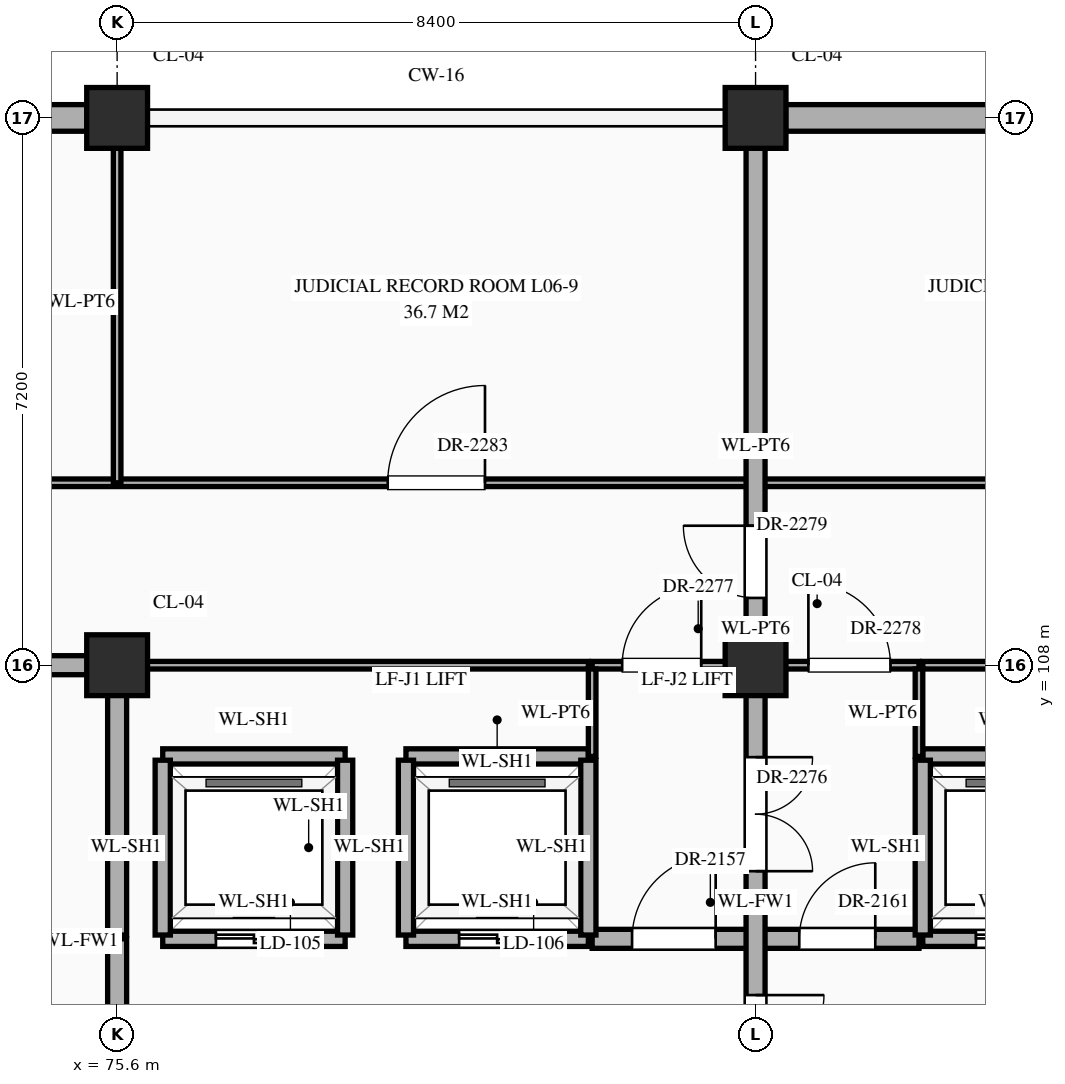
"""IFC4 building model, lengths in metres.
Left out: names, types, materials, properties, quantities, classifications, styles, units other than length and angle.
Written with IfcOpenShell. Run it as: python <this file> out.ifc"""

import sys

from ifc_helpers import new_model, si_unit, direction, frame, frame_2d, origin, origin_2d, place, context, subcontext, project, spatial, rectangle, extrude, element, fill, save


model = new_model("IFC4")
c1 = context("Model", 3, precision=1e-05, world=origin(), true_north=direction((0.0, 1.0)))
c2 = subcontext(c1, "Body", "Model", "MODEL_VIEW")
j1 = project(units=[si_unit("LENGTHUNIT", "METRE"), si_unit("PLANEANGLEUNIT", "RADIAN")], contexts=[c1])
p1 = place(None, origin())
s1 = spatial("IfcSite", under=j1, at=p1, CompositionType="ELEMENT")
p2 = place(p1, origin())
s2 = spatial("IfcBuilding", under=s1, at=p2, CompositionType="ELEMENT")
p3 = place(p2, frame((0.0, 0.0, 26.1)))
s3 = spatial("IfcBuildingStorey", under=s2, at=p3, CompositionType="ELEMENT", Elevation=26.1)
for number, where, z_axis, x_axis in (
    (1, (75.6, 108.0, 0.0), (0.0, 0.0, 1.0), (1.0, 0.0, 0.0)),
    (2, (75.6, 115.2, 0.0), (0.0, 0.0, 1.0), (1.0, 0.0, 0.0)),
    (3, (84.0, 108.0, 0.0), (0.0, 0.0, 1.0), (1.0, 0.0, 0.0)),
    (4, (84.0, 115.2, 0.0), (0.0, 0.0, 1.0), (1.0, 0.0, 0.0)),
):
    element("IfcColumn", number, at=place(p3, frame(where, z_axis=z_axis, x_axis=x_axis)), inside=s3, PredefinedType="COLUMN", context=c2, shape_type="SweptSolid", body=[
        extrude(rectangle(XDim=0.8, YDim=0.8, at=origin_2d()), origin(), (0.0, 0.0, 1.0), 4.5),
    ])
p4 = place(p3, frame((67.595, 115.2, 0.0), z_axis=(0.0, 0.0, 1.0), x_axis=(1.0, 0.0, 0.0)))
e5 = element("IfcWall", 5, at=p4, inside=s3, PredefinedType="STANDARD", context=c2, shape_type="SweptSolid", body=[
    extrude(rectangle(XDim=7.61, YDim=0.35, at=frame_2d((3.805, 0.0))), origin(), (0.0, 0.0, 1.0), 3.59),
])
p5 = place(p4, frame((3.28, 0.0, 0.85)))
e6 = element("IfcOpeningElement", 6, at=p5, cuts=e5, PredefinedType="OPENING", context=c2, shape_type="SweptSolid", body=[
    extrude(rectangle(XDim=1.05, YDim=1.74, at=frame_2d((0.525, 0.87))), frame((0.0, 0.187, 0.0), z_axis=(0.0, -1.0, 0.0), x_axis=(1.0, 0.0, 0.0)), (0.0, 0.0, 1.0), 0.374),
])
p6 = place(p3, frame((84.395, 115.2, 0.0), z_axis=(0.0, 0.0, 1.0), x_axis=(1.0, 0.0, 0.0)))
e7 = element("IfcWall", 7, at=p6, inside=s3, PredefinedType="STANDARD", context=c2, shape_type="SweptSolid", body=[
    extrude(rectangle(XDim=7.61, YDim=0.35, at=frame_2d((3.805, 0.0))), origin(), (0.0, 0.0, 1.0), 3.59),
])
p7 = place(p6, frame((3.28, 0.0, 0.85)))
e8 = element("IfcOpeningElement", 8, at=p7, cuts=e7, PredefinedType="OPENING", context=c2, shape_type="SweptSolid", body=[
    extrude(rectangle(XDim=1.05, YDim=2.12, at=frame_2d((0.525, 1.06))), frame((0.0, 0.187, 0.0), z_axis=(0.0, -1.0, 0.0), x_axis=(1.0, 0.0, 0.0)), (0.0, 0.0, 1.0), 0.374),
])
p8 = place(p3, frame((76.2, 104.4, 0.0), z_axis=(0.0, 0.0, 1.0), x_axis=(1.0, 0.0, 0.0)))
e9 = element("IfcWall", 9, at=p8, inside=s3, PredefinedType="STANDARD", context=c2, shape_type="SweptSolid", body=[
    extrude(rectangle(XDim=2.4, YDim=0.2, at=frame_2d((1.2, 0.0))), origin(), (0.0, 0.0, 1.0), 4.24),
])
p9 = place(p8, frame((0.7, 0.0, 0.0)))
e10 = element("IfcOpeningElement", 10, at=p9, cuts=e9, PredefinedType="OPENING", context=c2, shape_type="SweptSolid", body=[
    extrude(rectangle(XDim=1.0, YDim=2.15, at=frame_2d((0.5, 1.075))), frame((0.0, 0.112, 0.0), z_axis=(0.0, -1.0, 0.0), x_axis=(1.0, 0.0, 0.0)), (0.0, 0.0, 1.0), 0.224),
])
p10 = place(p3, frame((79.4, 104.4, 0.0), z_axis=(0.0, 0.0, 1.0), x_axis=(1.0, 0.0, 0.0)))
e11 = element("IfcWall", 11, at=p10, inside=s3, PredefinedType="STANDARD", context=c2, shape_type="SweptSolid", body=[
    extrude(rectangle(XDim=2.4, YDim=0.2, at=frame_2d((1.2, 0.0))), origin(), (0.0, 0.0, 1.0), 4.24),
])
p11 = place(p10, frame((0.7, 0.0, 0.0)))
e12 = element("IfcOpeningElement", 12, at=p11, cuts=e11, PredefinedType="OPENING", context=c2, shape_type="SweptSolid", body=[
    extrude(rectangle(XDim=1.0, YDim=2.15, at=frame_2d((0.5, 1.075))), frame((0.0, 0.112, 0.0), z_axis=(0.0, -1.0, 0.0), x_axis=(1.0, 0.0, 0.0)), (0.0, 0.0, 1.0), 0.224),
])
p12 = place(p3, frame((81.85, 104.4, 0.0), z_axis=(0.0, 0.0, 1.0), x_axis=(1.0, 0.0, 0.0)))
e13 = element("IfcWall", 13, at=p12, inside=s3, PredefinedType="STANDARD", context=c2, shape_type="SweptSolid", body=[
    extrude(rectangle(XDim=4.3, YDim=0.25, at=frame_2d((2.15, 0.0))), origin(), (0.0, 0.0, 1.0), 4.24),
])
p13 = place(p12, frame((0.525, 0.0, 0.0)))
e14 = element("IfcOpeningElement", 14, at=p13, cuts=e13, PredefinedType="OPENING", context=c2, shape_type="SweptSolid", body=[
    extrude(rectangle(XDim=1.1, YDim=2.2, at=frame_2d((0.55, 1.1))), frame((0.0, 0.137, 0.0), z_axis=(0.0, -1.0, 0.0), x_axis=(1.0, 0.0, 0.0)), (0.0, 0.0, 1.0), 0.274),
])
p14 = place(p12, frame((2.725, 0.0, 0.0)))
e15 = element("IfcOpeningElement", 15, at=p14, cuts=e13, PredefinedType="OPENING", context=c2, shape_type="SweptSolid", body=[
    extrude(rectangle(XDim=1.0, YDim=2.2, at=frame_2d((0.5, 1.1))), frame((0.0, 0.137, 0.0), z_axis=(0.0, -1.0, 0.0), x_axis=(1.0, 0.0, 0.0)), (0.0, 0.0, 1.0), 0.274),
])
p15 = place(p3, frame((86.2, 104.4, 0.0), z_axis=(0.0, 0.0, 1.0), x_axis=(1.0, 0.0, 0.0)))
e16 = element("IfcWall", 16, at=p15, inside=s3, PredefinedType="STANDARD", context=c2, shape_type="SweptSolid", body=[
    extrude(rectangle(XDim=2.4, YDim=0.2, at=frame_2d((1.2, 0.0))), origin(), (0.0, 0.0, 1.0), 4.24),
])
p16 = place(p15, frame((0.7, 0.0, 0.0)))
e17 = element("IfcOpeningElement", 17, at=p16, cuts=e16, PredefinedType="OPENING", context=c2, shape_type="SweptSolid", body=[
    extrude(rectangle(XDim=1.0, YDim=2.15, at=frame_2d((0.5, 1.075))), frame((0.0, 0.112, 0.0), z_axis=(0.0, -1.0, 0.0), x_axis=(1.0, 0.0, 0.0)), (0.0, 0.0, 1.0), 0.224),
])
for number, where, z_axis, x_axis in (
    (18, (76.2, 106.8, 0.0), (0.0, 0.0, 1.0), (1.0, 0.0, 0.0)),
    (19, (79.4, 106.8, 0.0), (0.0, 0.0, 1.0), (1.0, 0.0, 0.0)),
    (20, (86.2, 106.8, 0.0), (0.0, 0.0, 1.0), (1.0, 0.0, 0.0)),
):
    element("IfcWall", number, at=place(p3, frame(where, z_axis=z_axis, x_axis=x_axis)), inside=s3, PredefinedType="STANDARD", context=c2, shape_type="SweptSolid", body=[
        extrude(rectangle(XDim=2.4, YDim=0.2, at=frame_2d((1.2, 0.0))), origin(), (0.0, 0.0, 1.0), 4.24),
    ])
p17 = place(p3, frame((71.4, 108.0, 0.0), z_axis=(0.0, 0.0, 1.0), x_axis=(1.0, 0.0, 0.0)))
e21 = element("IfcWall", 21, at=p17, inside=s3, PredefinedType="STANDARD", context=c2, shape_type="SweptSolid", body=[
    extrude(rectangle(XDim=4.2, YDim=0.25, at=frame_2d((2.1, 0.0))), origin(), (0.0, 0.0, 1.0), 3.39),
])
p18 = place(p17, frame((1.39, 0.0, 0.0)))
e22 = element("IfcOpeningElement", 22, at=p18, cuts=e21, PredefinedType="OPENING", context=c2, shape_type="SweptSolid", body=[
    extrude(rectangle(XDim=1.1, YDim=2.2, at=frame_2d((0.55, 1.1))), frame((0.0, 0.137, 0.0), z_axis=(0.0, -1.0, 0.0), x_axis=(1.0, 0.0, 0.0)), (0.0, 0.0, 1.0), 0.274),
])
p19 = place(p3, frame((75.65, 108.0, 0.0), z_axis=(0.0, 0.0, 1.0), x_axis=(1.0, 0.0, 0.0)))
e23 = element("IfcWall", 23, at=p19, inside=s3, PredefinedType="STANDARD", context=c2, shape_type="SweptSolid", body=[
    extrude(rectangle(XDim=6.15, YDim=0.1, at=frame_2d((3.075, 0.0))), origin(), (0.0, 0.0, 1.0), 3.39),
])
p20 = place(p3, frame((81.85, 108.0, 0.0), z_axis=(0.0, 0.0, 1.0), x_axis=(1.0, 0.0, 0.0)))
e24 = element("IfcWall", 24, at=p20, inside=s3, PredefinedType="STANDARD", context=c2, shape_type="SweptSolid", body=[
    extrude(rectangle(XDim=4.3, YDim=0.1, at=frame_2d((2.15, 0.0))), origin(), (0.0, 0.0, 1.0), 3.39),
])
p21 = place(p20, frame((0.395, 0.0, 0.0)))
e25 = element("IfcOpeningElement", 25, at=p21, cuts=e24, PredefinedType="OPENING", context=c2, shape_type="SweptSolid", body=[
    extrude(rectangle(XDim=1.04, YDim=2.2, at=frame_2d((0.52, 1.1))), frame((0.0, 0.062, 0.0), z_axis=(0.0, -1.0, 0.0), x_axis=(1.0, 0.0, 0.0)), (0.0, 0.0, 1.0), 0.124),
])
p22 = place(p20, frame((2.845, 0.0, 0.0)))
e26 = element("IfcOpeningElement", 26, at=p22, cuts=e24, PredefinedType="OPENING", context=c2, shape_type="SweptSolid", body=[
    extrude(rectangle(XDim=1.08, YDim=2.25, at=frame_2d((0.54, 1.125))), frame((0.0, 0.062, 0.0), z_axis=(0.0, -1.0, 0.0), x_axis=(1.0, 0.0, 0.0)), (0.0, 0.0, 1.0), 0.124),
])
p23 = place(p3, frame((86.2, 108.0, 0.0), z_axis=(0.0, 0.0, 1.0), x_axis=(1.0, 0.0, 0.0)))
e27 = element("IfcWall", 27, at=p23, inside=s3, PredefinedType="STANDARD", context=c2, shape_type="SweptSolid", body=[
    extrude(rectangle(XDim=6.15, YDim=0.1, at=frame_2d((3.075, 0.0))), origin(), (0.0, 0.0, 1.0), 3.39),
])
p24 = place(p3, frame((67.2, 110.4, 0.0), z_axis=(0.0, 0.0, 1.0), x_axis=(1.0, 0.0, 0.0)))
e28 = element("IfcWall", 28, at=p24, inside=s3, PredefinedType="STANDARD", context=c2, shape_type="SweptSolid", body=[
    extrude(rectangle(XDim=33.6, YDim=0.1, at=frame_2d((16.8, 0.0))), origin(), (0.0, 0.0, 1.0), 4.24),
])
p25 = place(p24, frame((3.58, 0.0, 0.0)))
e29 = element("IfcOpeningElement", 29, at=p25, cuts=e28, PredefinedType="OPENING", context=c2, shape_type="SweptSolid", body=[
    extrude(rectangle(XDim=1.24, YDim=2.3, at=frame_2d((0.62, 1.15))), frame((0.0, 0.062, 0.0), z_axis=(0.0, -1.0, 0.0), x_axis=(1.0, 0.0, 0.0)), (0.0, 0.0, 1.0), 0.124),
])
p26 = place(p24, frame((11.96, 0.0, 0.0)))
e30 = element("IfcOpeningElement", 30, at=p26, cuts=e28, PredefinedType="OPENING", context=c2, shape_type="SweptSolid", body=[
    extrude(rectangle(XDim=1.28, YDim=2.35, at=frame_2d((0.64, 1.175))), frame((0.0, 0.062, 0.0), z_axis=(0.0, -1.0, 0.0), x_axis=(1.0, 0.0, 0.0)), (0.0, 0.0, 1.0), 0.124),
])
p27 = place(p24, frame((20.53, 0.0, 0.0)))
e31 = element("IfcOpeningElement", 31, at=p27, cuts=e28, PredefinedType="OPENING", context=c2, shape_type="SweptSolid", body=[
    extrude(rectangle(XDim=0.94, YDim=2.3, at=frame_2d((0.47, 1.15))), frame((0.0, 0.062, 0.0), z_axis=(0.0, -1.0, 0.0), x_axis=(1.0, 0.0, 0.0)), (0.0, 0.0, 1.0), 0.124),
])
p28 = place(p24, frame((28.91, 0.0, 0.0)))
e32 = element("IfcOpeningElement", 32, at=p28, cuts=e28, PredefinedType="OPENING", context=c2, shape_type="SweptSolid", body=[
    extrude(rectangle(XDim=0.98, YDim=2.35, at=frame_2d((0.49, 1.175))), frame((0.0, 0.062, 0.0), z_axis=(0.0, -1.0, 0.0), x_axis=(1.0, 0.0, 0.0)), (0.0, 0.0, 1.0), 0.124),
])
p29 = place(p3, frame((75.6, 100.8, 0.0), z_axis=(0.0, 0.0, 1.0), x_axis=(0.0, 1.0, 0.0)))
e33 = element("IfcWall", 33, at=p29, inside=s3, PredefinedType="STANDARD", context=c2, shape_type="SweptSolid", body=[
    extrude(rectangle(XDim=3.6, YDim=0.25, at=frame_2d((1.8, 0.0))), origin(), (0.0, 0.0, 1.0), 3.49),
])
p30 = place(p29, frame((0.86, 0.0, 0.0)))
e34 = element("IfcOpeningElement", 34, at=p30, cuts=e33, PredefinedType="OPENING", context=c2, shape_type="SweptSolid", body=[
    extrude(rectangle(XDim=1.0, YDim=2.2, at=frame_2d((0.5, 1.1))), frame((0.0, 0.137, 0.0), z_axis=(0.0, -1.0, 0.0), x_axis=(1.0, 0.0, 0.0)), (0.0, 0.0, 1.0), 0.274),
])
p31 = place(p3, frame((75.6, 104.45, 0.0), z_axis=(0.0, 0.0, 1.0), x_axis=(0.0, 1.0, 0.0)))
e35 = element("IfcWall", 35, at=p31, inside=s3, PredefinedType="STANDARD", context=c2, shape_type="SweptSolid", body=[
    extrude(rectangle(XDim=3.5, YDim=0.25, at=frame_2d((1.75, 0.0))), origin(), (0.0, 0.0, 1.0), 3.49),
])
p32 = place(p3, frame((75.6, 110.4, 0.0), z_axis=(0.0, 0.0, 1.0), x_axis=(0.0, 1.0, 0.0)))
e36 = element("IfcWall", 36, at=p32, inside=s3, PredefinedType="STANDARD", context=c2, shape_type="SweptSolid", body=[
    extrude(rectangle(XDim=4.76, YDim=0.1, at=frame_2d((2.38, 0.0))), origin(), (0.0, 0.0, 1.0), 3.49),
])
for number, where, z_axis, x_axis in (
    (37, (76.2, 104.45, 0.0), (0.0, 0.0, 1.0), (0.0, 1.0, 0.0)),
    (38, (78.6, 104.45, 0.0), (0.0, 0.0, 1.0), (0.0, 1.0, 0.0)),
    (39, (79.4, 104.45, 0.0), (0.0, 0.0, 1.0), (0.0, 1.0, 0.0)),
    (40, (81.8, 104.45, 0.0), (0.0, 0.0, 1.0), (0.0, 1.0, 0.0)),
):
    element("IfcWall", number, at=place(p3, frame(where, z_axis=z_axis, x_axis=x_axis)), inside=s3, PredefinedType="STANDARD", context=c2, shape_type="SweptSolid", body=[
        extrude(rectangle(XDim=2.3, YDim=0.2, at=frame_2d((1.15, 0.0))), origin(), (0.0, 0.0, 1.0), 4.24),
    ])
p33 = place(p3, frame((81.85, 106.8, 0.0), z_axis=(0.0, 0.0, 1.0), x_axis=(0.0, 1.0, 0.0)))
e41 = element("IfcWall", 41, at=p33, inside=s3, PredefinedType="STANDARD", context=c2, shape_type="SweptSolid", body=[
    extrude(rectangle(XDim=1.15, YDim=0.1, at=frame_2d((0.575, 0.0))), origin(), (0.0, 0.0, 1.0), 4.24),
])
p34 = place(p3, frame((84.0, 79.24, 0.0), z_axis=(0.0, 0.0, 1.0), x_axis=(0.0, 1.0, 0.0)))
e42 = element("IfcWall", 42, at=p34, inside=s3, PredefinedType="STANDARD", context=c2, shape_type="SweptSolid", body=[
    extrude(rectangle(XDim=35.92, YDim=0.25, at=frame_2d((17.96, 0.0))), origin(), (0.0, 0.0, 1.0), 3.49),
])
p35 = place(p34, frame((22.62, 0.0, 0.0)))
e43 = element("IfcOpeningElement", 43, at=p35, cuts=e42, PredefinedType="OPENING", context=c2, shape_type="SweptSolid", body=[
    extrude(rectangle(XDim=1.8, YDim=2.35, at=frame_2d((0.9, 1.175))), frame((0.0, 0.137, 0.0), z_axis=(0.0, -1.0, 0.0), x_axis=(1.0, 0.0, 0.0)), (0.0, 0.0, 1.0), 0.274),
])
p36 = place(p34, frame((12.5, 0.0, 0.0)))
e44 = element("IfcOpeningElement", 44, at=p36, cuts=e42, PredefinedType="OPENING", context=c2, shape_type="SweptSolid", body=[
    extrude(rectangle(XDim=1.0, YDim=2.2, at=frame_2d((0.5, 1.1))), frame((0.0, 0.137, 0.0), z_axis=(0.0, -1.0, 0.0), x_axis=(1.0, 0.0, 0.0)), (0.0, 0.0, 1.0), 0.274),
])
p37 = place(p34, frame((15.17, 0.0, 0.0)))
e45 = element("IfcOpeningElement", 45, at=p37, cuts=e42, PredefinedType="OPENING", context=c2, shape_type="SweptSolid", body=[
    extrude(rectangle(XDim=1.1, YDim=2.2, at=frame_2d((0.55, 1.1))), frame((0.0, 0.137, 0.0), z_axis=(0.0, -1.0, 0.0), x_axis=(1.0, 0.0, 0.0)), (0.0, 0.0, 1.0), 0.274),
])
p38 = place(p34, frame((26.05, 0.0, 0.0)))
e46 = element("IfcOpeningElement", 46, at=p38, cuts=e42, PredefinedType="OPENING", context=c2, shape_type="SweptSolid", body=[
    extrude(rectangle(XDim=1.5, YDim=2.25, at=frame_2d((0.75, 1.125))), frame((0.0, 0.137, 0.0), z_axis=(0.0, -1.0, 0.0), x_axis=(1.0, 0.0, 0.0)), (0.0, 0.0, 1.0), 0.274),
])
p39 = place(p34, frame((29.645, 0.0, 0.0)))
e47 = element("IfcOpeningElement", 47, at=p39, cuts=e42, PredefinedType="OPENING", context=c2, shape_type="SweptSolid", body=[
    extrude(rectangle(XDim=0.95, YDim=2.15, at=frame_2d((0.475, 1.075))), frame((0.0, 0.137, 0.0), z_axis=(0.0, -1.0, 0.0), x_axis=(1.0, 0.0, 0.0)), (0.0, 0.0, 1.0), 0.274),
])
p40 = place(p34, frame((5.325, 0.0, 0.0)))
e48 = element("IfcOpeningElement", 48, at=p40, cuts=e42, PredefinedType="OPENING", context=c2, shape_type="SweptSolid", body=[
    extrude(rectangle(XDim=0.95, YDim=2.15, at=frame_2d((0.475, 1.075))), frame((0.0, 0.137, 0.0), z_axis=(0.0, -1.0, 0.0), x_axis=(1.0, 0.0, 0.0)), (0.0, 0.0, 1.0), 0.274),
])
p41 = place(p3, frame((86.15, 106.8, 0.0), z_axis=(0.0, 0.0, 1.0), x_axis=(0.0, 1.0, 0.0)))
e49 = element("IfcWall", 49, at=p41, inside=s3, PredefinedType="STANDARD", context=c2, shape_type="SweptSolid", body=[
    extrude(rectangle(XDim=1.15, YDim=0.1, at=frame_2d((0.575, 0.0))), origin(), (0.0, 0.0, 1.0), 4.24),
])
p42 = place(p3, frame((86.2, 104.45, 0.0), z_axis=(0.0, 0.0, 1.0), x_axis=(0.0, 1.0, 0.0)))
e50 = element("IfcWall", 50, at=p42, inside=s3, PredefinedType="STANDARD", context=c2, shape_type="SweptSolid", body=[
    extrude(rectangle(XDim=2.3, YDim=0.2, at=frame_2d((1.15, 0.0))), origin(), (0.0, 0.0, 1.0), 4.24),
])
p43 = place(p9, origin())
e51 = element("IfcDoor", 51, at=p43, inside=s3, OperationType="DOUBLE_DOOR_SLIDING", PredefinedType="DOOR", context=c2, shape_type="SweptSolid", body=[
    extrude(rectangle(XDim=1.0, YDim=2.15, at=frame_2d((0.5, 1.075))), frame((0.0, 0.025, 0.0), z_axis=(0.0, -1.0, 0.0), x_axis=(1.0, 0.0, 0.0)), (0.0, 0.0, 1.0), 0.05),
])
fill(e10, e51)
p44 = place(p11, origin())
e52 = element("IfcDoor", 52, at=p44, inside=s3, OperationType="DOUBLE_DOOR_SLIDING", PredefinedType="DOOR", context=c2, shape_type="SweptSolid", body=[
    extrude(rectangle(XDim=1.0, YDim=2.15, at=frame_2d((0.5, 1.075))), frame((0.0, 0.025, 0.0), z_axis=(0.0, -1.0, 0.0), x_axis=(1.0, 0.0, 0.0)), (0.0, 0.0, 1.0), 0.05),
])
fill(e12, e52)
p45 = place(p16, origin())
e53 = element("IfcDoor", 53, at=p45, inside=s3, OperationType="DOUBLE_DOOR_SLIDING", PredefinedType="DOOR", context=c2, shape_type="SweptSolid", body=[
    extrude(rectangle(XDim=1.0, YDim=2.15, at=frame_2d((0.5, 1.075))), frame((0.0, 0.025, 0.0), z_axis=(0.0, -1.0, 0.0), x_axis=(1.0, 0.0, 0.0)), (0.0, 0.0, 1.0), 0.05),
])
fill(e17, e53)
p46 = place(p35, frame((1.8, 0.0, 0.0), z_axis=(0.0, 0.0, 1.0), x_axis=(-1.0, 0.0, 0.0)))
e54 = element("IfcDoor", 54, at=p46, inside=s3, OperationType="DOUBLE_DOOR_SINGLE_SWING", PredefinedType="DOOR", context=c2, shape_type="SweptSolid", body=[
    extrude(rectangle(XDim=1.8, YDim=2.35, at=frame_2d((0.9, 1.175))), frame((0.0, 0.025, 0.0), z_axis=(0.0, -1.0, 0.0), x_axis=(1.0, 0.0, 0.0)), (0.0, 0.0, 1.0), 0.05),
])
fill(e43, e54)
p47 = place(p13, origin())
e55 = element("IfcDoor", 55, at=p47, inside=s3, OperationType="SINGLE_SWING_RIGHT", PredefinedType="DOOR", context=c2, shape_type="SweptSolid", body=[
    extrude(rectangle(XDim=1.1, YDim=2.2, at=frame_2d((0.55, 1.1))), frame((0.0, 0.025, 0.0), z_axis=(0.0, -1.0, 0.0), x_axis=(1.0, 0.0, 0.0)), (0.0, 0.0, 1.0), 0.05),
])
fill(e14, e55)
p48 = place(p14, origin())
e56 = element("IfcDoor", 56, at=p48, inside=s3, OperationType="SINGLE_SWING_RIGHT", PredefinedType="DOOR", context=c2, shape_type="SweptSolid", body=[
    extrude(rectangle(XDim=1.0, YDim=2.2, at=frame_2d((0.5, 1.1))), frame((0.0, 0.025, 0.0), z_axis=(0.0, -1.0, 0.0), x_axis=(1.0, 0.0, 0.0)), (0.0, 0.0, 1.0), 0.05),
])
fill(e15, e56)
p49 = place(p38, frame((1.5, 0.0, 0.0), z_axis=(0.0, 0.0, 1.0), x_axis=(-1.0, 0.0, 0.0)))
e57 = element("IfcDoor", 57, at=p49, inside=s3, OperationType="DOUBLE_DOOR_SINGLE_SWING", PredefinedType="DOOR", context=c2, shape_type="SweptSolid", body=[
    extrude(rectangle(XDim=1.5, YDim=2.25, at=frame_2d((0.75, 1.125))), frame((0.0, 0.025, 0.0), z_axis=(0.0, -1.0, 0.0), x_axis=(1.0, 0.0, 0.0)), (0.0, 0.0, 1.0), 0.05),
])
fill(e46, e57)
p50 = place(p21, origin())
e58 = element("IfcDoor", 58, at=p50, inside=s3, OperationType="SINGLE_SWING_RIGHT", PredefinedType="DOOR", context=c2, shape_type="SweptSolid", body=[
    extrude(rectangle(XDim=1.04, YDim=2.2, at=frame_2d((0.52, 1.1))), frame((0.0, 0.025, 0.0), z_axis=(0.0, -1.0, 0.0), x_axis=(1.0, 0.0, 0.0)), (0.0, 0.0, 1.0), 0.05),
])
fill(e25, e58)
p51 = place(p22, origin())
e59 = element("IfcDoor", 59, at=p51, inside=s3, OperationType="SINGLE_SWING_LEFT", PredefinedType="DOOR", context=c2, shape_type="SweptSolid", body=[
    extrude(rectangle(XDim=1.08, YDim=2.25, at=frame_2d((0.54, 1.125))), frame((0.0, 0.025, 0.0), z_axis=(0.0, -1.0, 0.0), x_axis=(1.0, 0.0, 0.0)), (0.0, 0.0, 1.0), 0.05),
])
fill(e26, e59)
p52 = place(p39, origin())
e60 = element("IfcDoor", 60, at=p52, inside=s3, OperationType="SINGLE_SWING_RIGHT", PredefinedType="DOOR", context=c2, shape_type="SweptSolid", body=[
    extrude(rectangle(XDim=0.95, YDim=2.15, at=frame_2d((0.475, 1.075))), frame((0.0, 0.025, 0.0), z_axis=(0.0, -1.0, 0.0), x_axis=(1.0, 0.0, 0.0)), (0.0, 0.0, 1.0), 0.05),
])
fill(e47, e60)
p53 = place(p26, origin())
e61 = element("IfcDoor", 61, at=p53, inside=s3, OperationType="SINGLE_SWING_RIGHT", PredefinedType="DOOR", context=c2, shape_type="SweptSolid", body=[
    extrude(rectangle(XDim=1.28, YDim=2.35, at=frame_2d((0.64, 1.175))), frame((0.0, 0.025, 0.0), z_axis=(0.0, -1.0, 0.0), x_axis=(1.0, 0.0, 0.0)), (0.0, 0.0, 1.0), 0.05),
])
fill(e30, e61)
save(model, sys.argv[1])
